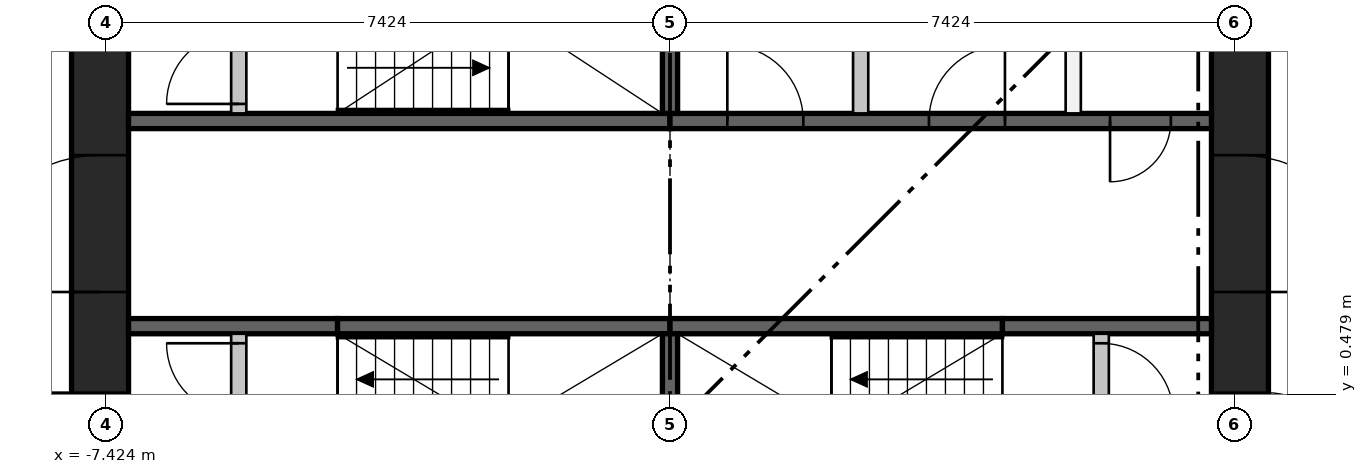
"""IFC4 building model, lengths in metres.
Left out: names, types, materials, properties, quantities, classifications, styles, units other than length and angle.
Written with IfcOpenShell. Run it as: python <this file> out.ifc"""

import sys

from ifc_helpers import new_model, si_unit, direction, frame, frame_2d, origin, place, context, subcontext, project, spatial, rectangle, extrude, element, fill, save


model = new_model("IFC4")
c1 = context("Model", 3, precision=1e-05, world=origin(), true_north=direction((0.0, 1.0)))
c2 = subcontext(c1, "Body", "Model", "MODEL_VIEW")
j1 = project(units=[si_unit("LENGTHUNIT", "METRE"), si_unit("PLANEANGLEUNIT", "RADIAN")], contexts=[c1])
p1 = place(None, origin())
s1 = spatial("IfcSite", under=j1, at=p1, CompositionType="ELEMENT")
p2 = place(p1, origin())
s2 = spatial("IfcBuilding", under=s1, at=p2, CompositionType="ELEMENT")
p3 = place(p2, frame((0.0, 0.0, 94.65)))
s3 = spatial("IfcBuildingStorey", under=s2, at=p3, CompositionType="ELEMENT", Elevation=94.65)
p4 = place(p3, frame((-7.499, -7.124, 0.0), z_axis=(0.0, 0.0, 1.0), x_axis=(0.0, 1.0, 0.0)))
e1 = element("IfcWall", 1, at=p4, inside=s3, PredefinedType="SHEAR", context=c2, shape_type="SweptSolid", body=[
    extrude(rectangle(XDim=14.248, YDim=0.75, at=frame_2d((7.124, 0.0))), origin(), (0.0, 0.0, 1.0), 3.65),
])
p5 = place(p4, frame((6.624, 0.0, 0.0)))
e2 = element("IfcOpeningElement", 2, at=p5, cuts=e1, PredefinedType="OPENING", context=c2, shape_type="SweptSolid", body=[
    extrude(rectangle(XDim=1.0, YDim=2.1, at=frame_2d((0.5, 1.05))), frame((0.0, 0.385, 0.0), z_axis=(0.0, -1.0, 0.0), x_axis=(1.0, 0.0, 0.0)), (0.0, 0.0, 1.0), 0.77),
])
p6 = place(p4, frame((3.5, 0.0, 0.0)))
e3 = element("IfcOpeningElement", 3, at=p6, cuts=e1, PredefinedType="OPENING", context=c2, shape_type="SweptSolid", body=[
    extrude(rectangle(XDim=1.8, YDim=2.1, at=frame_2d((0.9, 1.05))), frame((0.0, 0.385, 0.0), z_axis=(0.0, -1.0, 0.0), x_axis=(1.0, 0.0, 0.0)), (0.0, 0.0, 1.0), 0.77),
])
p7 = place(p4, frame((8.948, 0.0, 0.0)))
e4 = element("IfcOpeningElement", 4, at=p7, cuts=e1, PredefinedType="OPENING", context=c2, shape_type="SweptSolid", body=[
    extrude(rectangle(XDim=1.8, YDim=2.1, at=frame_2d((0.9, 1.05))), frame((0.0, 0.385, 0.0), z_axis=(0.0, -1.0, 0.0), x_axis=(1.0, 0.0, 0.0)), (0.0, 0.0, 1.0), 0.77),
])
p8 = place(p4, frame((12.124, 0.0, 0.0)))
e5 = element("IfcOpeningElement", 5, at=p8, cuts=e1, PredefinedType="OPENING", context=c2, shape_type="SweptSolid", body=[
    extrude(rectangle(XDim=1.0, YDim=2.1, at=frame_2d((0.5, 1.05))), frame((0.0, 0.385, 0.0), z_axis=(0.0, -1.0, 0.0), x_axis=(1.0, 0.0, 0.0)), (0.0, 0.0, 1.0), 0.77),
])
p9 = place(p3, frame((7.499, -7.124, 0.0), z_axis=(0.0, 0.0, 1.0), x_axis=(0.0, 1.0, 0.0)))
e6 = element("IfcWall", 6, at=p9, inside=s3, PredefinedType="SHEAR", context=c2, shape_type="SweptSolid", body=[
    extrude(rectangle(XDim=14.248, YDim=0.75, at=frame_2d((7.124, 0.0))), origin(), (0.0, 0.0, 1.0), 3.65),
])
p10 = place(p9, frame((6.624, 0.0, 0.0)))
e7 = element("IfcOpeningElement", 7, at=p10, cuts=e6, PredefinedType="OPENING", context=c2, shape_type="SweptSolid", body=[
    extrude(rectangle(XDim=1.0, YDim=2.1, at=frame_2d((0.5, 1.05))), frame((0.0, 0.385, 0.0), z_axis=(0.0, -1.0, 0.0), x_axis=(1.0, 0.0, 0.0)), (0.0, 0.0, 1.0), 0.77),
])
p11 = place(p9, frame((3.5, 0.0, 0.0)))
e8 = element("IfcOpeningElement", 8, at=p11, cuts=e6, PredefinedType="OPENING", context=c2, shape_type="SweptSolid", body=[
    extrude(rectangle(XDim=1.8, YDim=2.1, at=frame_2d((0.9, 1.05))), frame((0.0, 0.385, 0.0), z_axis=(0.0, -1.0, 0.0), x_axis=(1.0, 0.0, 0.0)), (0.0, 0.0, 1.0), 0.77),
])
p12 = place(p9, frame((8.948, 0.0, 0.0)))
e9 = element("IfcOpeningElement", 9, at=p12, cuts=e6, PredefinedType="OPENING", context=c2, shape_type="SweptSolid", body=[
    extrude(rectangle(XDim=1.8, YDim=2.1, at=frame_2d((0.9, 1.05))), frame((0.0, 0.385, 0.0), z_axis=(0.0, -1.0, 0.0), x_axis=(1.0, 0.0, 0.0)), (0.0, 0.0, 1.0), 0.77),
])
p13 = place(p3, frame((-7.124, 4.074, 0.0), z_axis=(0.0, 0.0, 1.0), x_axis=(1.0, 0.0, 0.0)))
e10 = element("IfcWall", 10, at=p13, inside=s3, PredefinedType="SHEAR", context=c2, shape_type="SweptSolid", body=[
    extrude(rectangle(XDim=7.124, YDim=0.2, at=frame_2d((3.562, 0.0))), origin(), (0.0, 0.0, 1.0), 3.3),
])
p14 = place(p3, frame((0.0, 4.074, 0.0), z_axis=(0.0, 0.0, 1.0), x_axis=(1.0, 0.0, 0.0)))
e11 = element("IfcWall", 11, at=p14, inside=s3, PredefinedType="SHEAR", context=c2, shape_type="SweptSolid", body=[
    extrude(rectangle(XDim=7.124, YDim=0.2, at=frame_2d((3.562, 0.0))), origin(), (0.0, 0.0, 1.0), 3.3),
])
p15 = place(p14, frame((0.754, 0.0, 0.0)))
e12 = element("IfcOpeningElement", 12, at=p15, cuts=e11, PredefinedType="OPENING", context=c2, shape_type="SweptSolid", body=[
    extrude(rectangle(XDim=1.0, YDim=2.1, at=frame_2d((0.5, 1.05))), frame((0.0, 0.11, 0.0), z_axis=(0.0, -1.0, 0.0), x_axis=(1.0, 0.0, 0.0)), (0.0, 0.0, 1.0), 0.22),
])
p16 = place(p14, frame((3.407, 0.0, 0.0)))
e13 = element("IfcOpeningElement", 13, at=p16, cuts=e11, PredefinedType="OPENING", context=c2, shape_type="SweptSolid", body=[
    extrude(rectangle(XDim=1.0, YDim=2.1, at=frame_2d((0.5, 1.05))), frame((0.0, 0.11, 0.0), z_axis=(0.0, -1.0, 0.0), x_axis=(1.0, 0.0, 0.0)), (0.0, 0.0, 1.0), 0.22),
])
p17 = place(p14, frame((5.79, 0.0, 0.0)))
e14 = element("IfcOpeningElement", 14, at=p17, cuts=e11, PredefinedType="OPENING", context=c2, shape_type="SweptSolid", body=[
    extrude(rectangle(XDim=0.8, YDim=2.1, at=frame_2d((0.4, 1.05))), frame((0.0, 0.11, 0.0), z_axis=(0.0, -1.0, 0.0), x_axis=(1.0, 0.0, 0.0)), (0.0, 0.0, 1.0), 0.22),
])
p18 = place(p3, frame((-7.124, 1.375, 0.0), z_axis=(0.0, 0.0, 1.0), x_axis=(1.0, 0.0, 0.0)))
e15 = element("IfcWall", 15, at=p18, inside=s3, PredefinedType="SHEAR", context=c2, shape_type="SweptSolid", body=[
    extrude(rectangle(XDim=2.75, YDim=0.2, at=frame_2d((1.375, 0.0))), origin(), (0.0, 0.0, 1.0), 3.3),
])
for number, where, z_axis, x_axis in (
    (16, (-4.374, 1.375, 0.0), (0.0, 0.0, 1.0), (1.0, 0.0, 0.0)),
    (17, (0.0, 1.375, 0.0), (0.0, 0.0, 1.0), (1.0, 0.0, 0.0)),
):
    element("IfcWall", number, at=place(p3, frame(where, z_axis=z_axis, x_axis=x_axis)), inside=s3, PredefinedType="SHEAR", context=c2, shape_type="SweptSolid", body=[
        extrude(rectangle(XDim=4.374, YDim=0.2, at=frame_2d((2.187, 0.0))), origin(), (0.0, 0.0, 1.0), 3.3),
    ])
p19 = place(p3, frame((4.374, 1.375, 0.0), z_axis=(0.0, 0.0, 1.0), x_axis=(1.0, 0.0, 0.0)))
e18 = element("IfcWall", 18, at=p19, inside=s3, PredefinedType="SHEAR", context=c2, shape_type="SweptSolid", body=[
    extrude(rectangle(XDim=2.75, YDim=0.2, at=frame_2d((1.375, 0.0))), origin(), (0.0, 0.0, 1.0), 3.3),
])
p20 = place(p3, frame((0.0, -1.275, 0.0), z_axis=(0.0, 0.0, 1.0), x_axis=(0.0, 1.0, 0.0)))
e19 = element("IfcWall", 19, at=p20, inside=s3, PredefinedType="SHEAR", context=c2, shape_type="SweptSolid", body=[
    extrude(rectangle(XDim=2.55, YDim=0.2, at=frame_2d((1.275, 0.0))), origin(), (0.0, 0.0, 1.0), 3.3),
])
p21 = place(p3, frame((0.0, 4.174, 0.0), z_axis=(0.0, 0.0, 1.0), x_axis=(0.0, 1.0, 0.0)))
e20 = element("IfcWall", 20, at=p21, inside=s3, PredefinedType="SHEAR", context=c2, shape_type="SweptSolid", body=[
    extrude(rectangle(XDim=1.4, YDim=0.2, at=frame_2d((0.7, 0.0))), origin(), (0.0, 0.0, 1.0), 3.3),
])
for number, where, z_axis, x_axis in (
    (21, (2.509, 4.174, 0.0), (0.0, 0.0, 1.0), (0.0, 1.0, 0.0)),
    (22, (5.305, 4.174, 0.0), (0.0, 0.0, 1.0), (0.0, 1.0, 0.0)),
):
    element("IfcWall", number, at=place(p3, frame(where, z_axis=z_axis, x_axis=x_axis)), inside=s3, PredefinedType="PARTITIONING", context=c2, shape_type="SweptSolid", body=[
        extrude(rectangle(XDim=2.95, YDim=0.2, at=frame_2d((1.475, 0.0))), origin(), (0.0, 0.0, 1.0), 3.3),
    ])
p22 = place(p3, frame((-5.674, -1.275, 0.0), z_axis=(0.0, 0.0, 1.0), x_axis=(0.0, 1.0, 0.0)))
e23 = element("IfcWall", 23, at=p22, inside=s3, PredefinedType="PARTITIONING", context=c2, shape_type="SweptSolid", body=[
    extrude(rectangle(XDim=2.55, YDim=0.2, at=frame_2d((1.275, 0.0))), origin(), (0.0, 0.0, 1.0), 3.3),
])
p23 = place(p22, frame((0.125, 0.0, 0.0)))
e24 = element("IfcOpeningElement", 24, at=p23, cuts=e23, PredefinedType="OPENING", context=c2, shape_type="SweptSolid", body=[
    extrude(rectangle(XDim=0.95, YDim=2.1, at=frame_2d((0.475, 1.05))), frame((0.0, 0.11, 0.0), z_axis=(0.0, -1.0, 0.0), x_axis=(1.0, 0.0, 0.0)), (0.0, 0.0, 1.0), 0.22),
])
p24 = place(p22, frame((1.475, 0.0, 0.0)))
e25 = element("IfcOpeningElement", 25, at=p24, cuts=e23, PredefinedType="OPENING", context=c2, shape_type="SweptSolid", body=[
    extrude(rectangle(XDim=0.95, YDim=2.1, at=frame_2d((0.475, 1.05))), frame((0.0, 0.11, 0.0), z_axis=(0.0, -1.0, 0.0), x_axis=(1.0, 0.0, 0.0)), (0.0, 0.0, 1.0), 0.22),
])
p25 = place(p3, frame((5.674, -1.275, 0.0), z_axis=(0.0, 0.0, 1.0), x_axis=(0.0, 1.0, 0.0)))
e26 = element("IfcWall", 26, at=p25, inside=s3, PredefinedType="PARTITIONING", context=c2, shape_type="SweptSolid", body=[
    extrude(rectangle(XDim=2.55, YDim=0.2, at=frame_2d((1.275, 0.0))), origin(), (0.0, 0.0, 1.0), 3.3),
])
p26 = place(p25, frame((0.125, 0.0, 0.0)))
e27 = element("IfcOpeningElement", 27, at=p26, cuts=e26, PredefinedType="OPENING", context=c2, shape_type="SweptSolid", body=[
    extrude(rectangle(XDim=0.95, YDim=2.1, at=frame_2d((0.475, 1.05))), frame((0.0, 0.11, 0.0), z_axis=(0.0, -1.0, 0.0), x_axis=(1.0, 0.0, 0.0)), (0.0, 0.0, 1.0), 0.22),
])
p27 = place(p25, frame((1.475, 0.0, 0.0)))
e28 = element("IfcOpeningElement", 28, at=p27, cuts=e26, PredefinedType="OPENING", context=c2, shape_type="SweptSolid", body=[
    extrude(rectangle(XDim=0.95, YDim=2.1, at=frame_2d((0.475, 1.05))), frame((0.0, 0.11, 0.0), z_axis=(0.0, -1.0, 0.0), x_axis=(1.0, 0.0, 0.0)), (0.0, 0.0, 1.0), 0.22),
])
p28 = place(p3, frame((-5.674, 4.174, 0.0), z_axis=(0.0, 0.0, 1.0), x_axis=(0.0, 1.0, 0.0)))
e29 = element("IfcWall", 29, at=p28, inside=s3, PredefinedType="PARTITIONING", context=c2, shape_type="SweptSolid", body=[
    extrude(rectangle(XDim=2.95, YDim=0.2, at=frame_2d((1.475, 0.0))), origin(), (0.0, 0.0, 1.0), 3.3),
])
p29 = place(p28, frame((0.125, 0.0, 0.0)))
e30 = element("IfcOpeningElement", 30, at=p29, cuts=e29, PredefinedType="OPENING", context=c2, shape_type="SweptSolid", body=[
    extrude(rectangle(XDim=0.95, YDim=2.1, at=frame_2d((0.475, 1.05))), frame((0.0, 0.11, 0.0), z_axis=(0.0, -1.0, 0.0), x_axis=(1.0, 0.0, 0.0)), (0.0, 0.0, 1.0), 0.22),
])
p30 = place(p28, frame((1.725, 0.0, 0.0)))
e31 = element("IfcOpeningElement", 31, at=p30, cuts=e29, PredefinedType="OPENING", context=c2, shape_type="SweptSolid", body=[
    extrude(rectangle(XDim=0.95, YDim=2.1, at=frame_2d((0.475, 1.05))), frame((0.0, 0.11, 0.0), z_axis=(0.0, -1.0, 0.0), x_axis=(1.0, 0.0, 0.0)), (0.0, 0.0, 1.0), 0.22),
])
p31 = place(p24, origin())
e32 = element("IfcDoor", 32, at=p31, inside=s3, OperationType="SINGLE_SWING_RIGHT", PredefinedType="DOOR", context=c2, shape_type="SweptSolid", body=[
    extrude(rectangle(XDim=0.95, YDim=2.1, at=frame_2d((0.475, 1.05))), frame((0.0, 0.025, 0.0), z_axis=(0.0, -1.0, 0.0), x_axis=(1.0, 0.0, 0.0)), (0.0, 0.0, 1.0), 0.05),
])
fill(e25, e32)
p32 = place(p27, frame((0.95, 0.0, 0.0), z_axis=(0.0, 0.0, 1.0), x_axis=(-1.0, 0.0, 0.0)))
e33 = element("IfcDoor", 33, at=p32, inside=s3, OperationType="SINGLE_SWING_LEFT", PredefinedType="DOOR", context=c2, shape_type="SweptSolid", body=[
    extrude(rectangle(XDim=0.95, YDim=2.1, at=frame_2d((0.475, 1.05))), frame((0.0, 0.025, 0.0), z_axis=(0.0, -1.0, 0.0), x_axis=(1.0, 0.0, 0.0)), (0.0, 0.0, 1.0), 0.05),
])
fill(e28, e33)
p33 = place(p29, origin())
e34 = element("IfcDoor", 34, at=p33, inside=s3, OperationType="SINGLE_SWING_LEFT", PredefinedType="DOOR", context=c2, shape_type="SweptSolid", body=[
    extrude(rectangle(XDim=0.95, YDim=2.1, at=frame_2d((0.475, 1.05))), frame((0.0, 0.025, 0.0), z_axis=(0.0, -1.0, 0.0), x_axis=(1.0, 0.0, 0.0)), (0.0, 0.0, 1.0), 0.05),
])
fill(e30, e34)
p34 = place(p15, origin())
e35 = element("IfcDoor", 35, at=p34, inside=s3, OperationType="SINGLE_SWING_LEFT", PredefinedType="DOOR", context=c2, shape_type="SweptSolid", body=[
    extrude(rectangle(XDim=1.0, YDim=2.1, at=frame_2d((0.5, 1.05))), frame((0.0, 0.025, 0.0), z_axis=(0.0, -1.0, 0.0), x_axis=(1.0, 0.0, 0.0)), (0.0, 0.0, 1.0), 0.05),
])
fill(e12, e35)
p35 = place(p16, origin())
e36 = element("IfcDoor", 36, at=p35, inside=s3, OperationType="SINGLE_SWING_RIGHT", PredefinedType="DOOR", context=c2, shape_type="SweptSolid", body=[
    extrude(rectangle(XDim=1.0, YDim=2.1, at=frame_2d((0.5, 1.05))), frame((0.0, 0.025, 0.0), z_axis=(0.0, -1.0, 0.0), x_axis=(1.0, 0.0, 0.0)), (0.0, 0.0, 1.0), 0.05),
])
fill(e13, e36)
p36 = place(p17, frame((0.8, 0.0, 0.0), z_axis=(0.0, 0.0, 1.0), x_axis=(-1.0, 0.0, 0.0)))
e37 = element("IfcDoor", 37, at=p36, inside=s3, OperationType="SINGLE_SWING_LEFT", PredefinedType="DOOR", context=c2, shape_type="SweptSolid", body=[
    extrude(rectangle(XDim=0.8, YDim=2.1, at=frame_2d((0.4, 1.05))), frame((0.0, 0.025, 0.0), z_axis=(0.0, -1.0, 0.0), x_axis=(1.0, 0.0, 0.0)), (0.0, 0.0, 1.0), 0.05),
])
fill(e14, e37)
p37 = place(p5, origin())
e38 = element("IfcDoor", 38, at=p37, inside=s3, OperationType="SINGLE_SWING_RIGHT", PredefinedType="DOOR", context=c2, shape_type="SweptSolid", body=[
    extrude(rectangle(XDim=1.0, YDim=2.1, at=frame_2d((0.5, 1.05))), frame((0.0, 0.375, 0.0), z_axis=(0.0, -1.0, 0.0), x_axis=(1.0, 0.0, 0.0)), (0.0, 0.0, 1.0), 0.05),
])
fill(e2, e38)
p38 = place(p7, origin())
e39 = element("IfcDoor", 39, at=p38, inside=s3, OperationType="DOUBLE_DOOR_SINGLE_SWING", PredefinedType="DOOR", context=c2, shape_type="SweptSolid", body=[
    extrude(rectangle(XDim=1.8, YDim=2.1, at=frame_2d((0.9, 1.05))), frame((0.0, 0.025, 0.0), z_axis=(0.0, -1.0, 0.0), x_axis=(1.0, 0.0, 0.0)), (0.0, 0.0, 1.0), 0.05),
])
fill(e4, e39)
p39 = place(p10, frame((1.0, 0.0, 0.0), z_axis=(0.0, 0.0, 1.0), x_axis=(-1.0, 0.0, 0.0)))
e40 = element("IfcDoor", 40, at=p39, inside=s3, OperationType="SINGLE_SWING_LEFT", PredefinedType="DOOR", context=c2, shape_type="SweptSolid", body=[
    extrude(rectangle(XDim=1.0, YDim=2.1, at=frame_2d((0.5, 1.05))), frame((0.0, 0.375, 0.0), z_axis=(0.0, -1.0, 0.0), x_axis=(1.0, 0.0, 0.0)), (0.0, 0.0, 1.0), 0.05),
])
fill(e7, e40)
p40 = place(p12, frame((1.8, 0.0, 0.0), z_axis=(0.0, 0.0, 1.0), x_axis=(-1.0, 0.0, 0.0)))
e41 = element("IfcDoor", 41, at=p40, inside=s3, OperationType="DOUBLE_DOOR_SINGLE_SWING", PredefinedType="DOOR", context=c2, shape_type="SweptSolid", body=[
    extrude(rectangle(XDim=1.8, YDim=2.1, at=frame_2d((0.9, 1.05))), frame((0.0, 0.025, 0.0), z_axis=(0.0, -1.0, 0.0), x_axis=(1.0, 0.0, 0.0)), (0.0, 0.0, 1.0), 0.05),
])
fill(e9, e41)
save(model, sys.argv[1])
